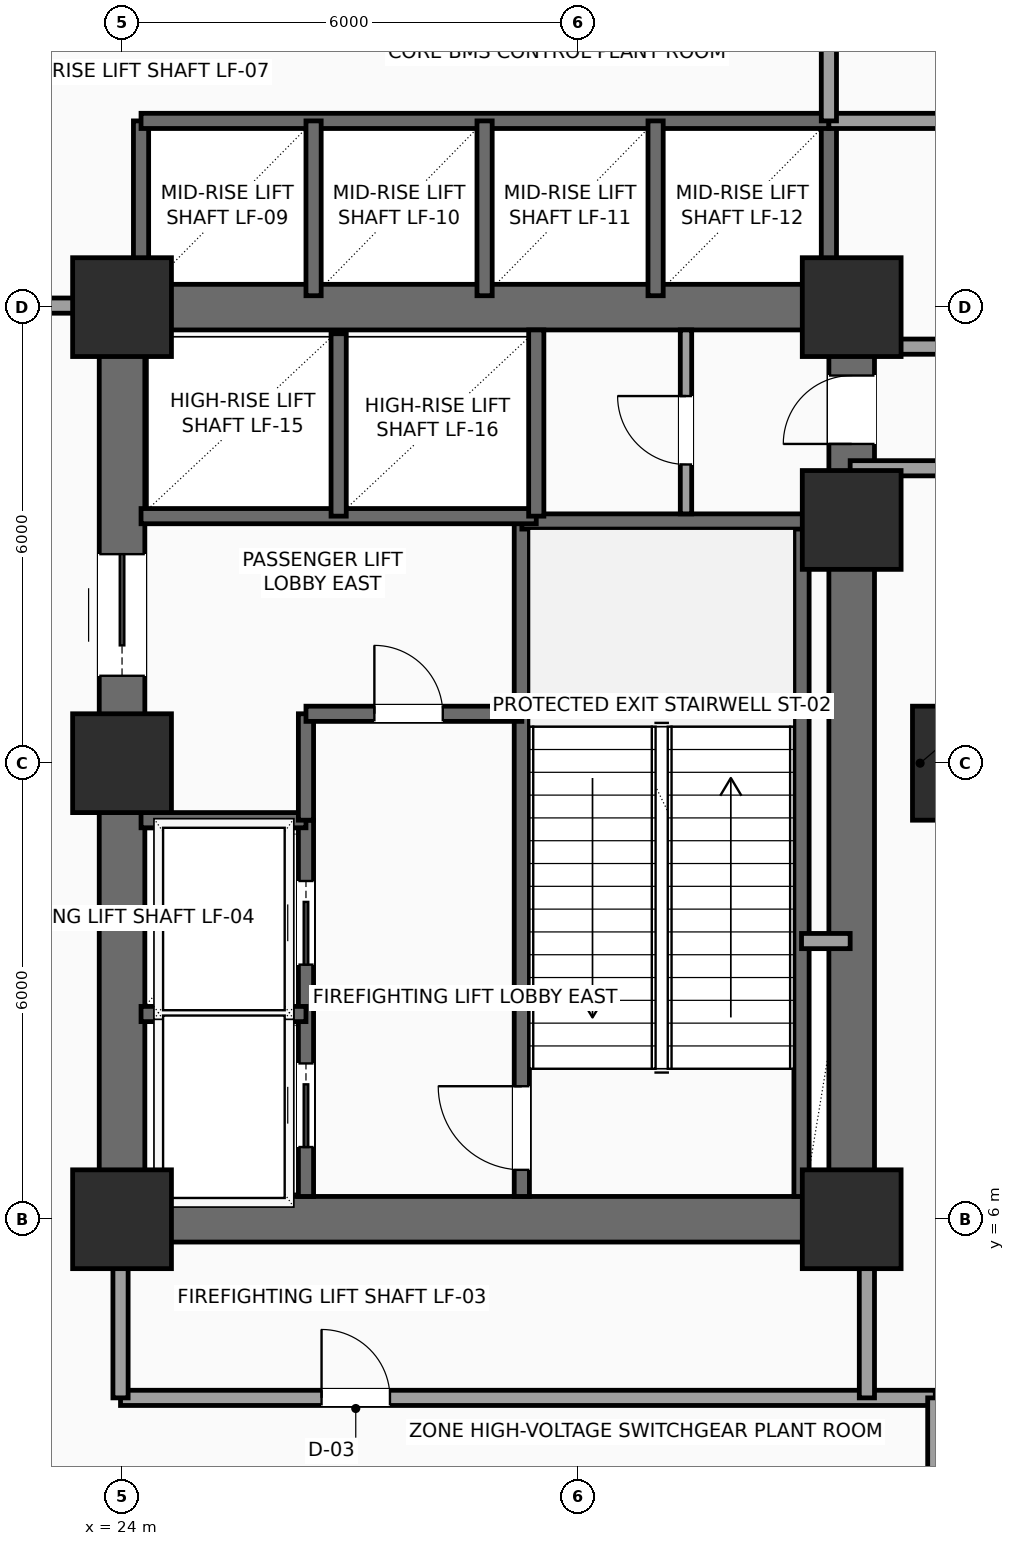
"""IFC4 building model, lengths in metres.
Left out: names, types, materials, properties, quantities, classifications, styles, units other than length and angle.
Written with IfcOpenShell. Run it as: python <this file> out.ifc"""

import sys

from ifc_helpers import new_model, si_unit, direction, frame, frame_2d, origin, origin_2d, place, context, subcontext, project, spatial, rectangle, extrude, element, fill, save


model = new_model("IFC4")
c1 = context("Model", 3, precision=1e-05, world=origin(), true_north=direction((0.0, 1.0)))
c2 = subcontext(c1, "Body", "Model", "MODEL_VIEW")
j1 = project(units=[si_unit("LENGTHUNIT", "METRE"), si_unit("PLANEANGLEUNIT", "RADIAN")], contexts=[c1])
p1 = place(None, origin())
s1 = spatial("IfcSite", under=j1, at=p1, CompositionType="ELEMENT")
p2 = place(p1, origin())
s2 = spatial("IfcBuilding", under=s1, at=p2, CompositionType="ELEMENT")
p3 = place(p2, frame((0.0, 0.0, 27.6)))
s3 = spatial("IfcBuildingStorey", under=s2, at=p3, CompositionType="ELEMENT", Elevation=27.6)
for number, where, z_axis, x_axis in (
    (1, (24.0, 6.0, 0.0), (0.0, 0.0, 1.0), (1.0, 0.0, 0.0)),
    (2, (24.0, 12.0, 0.0), (0.0, 0.0, 1.0), (1.0, 0.0, 0.0)),
    (3, (24.0, 18.0, 0.0), (0.0, 0.0, 1.0), (1.0, 0.0, 0.0)),
    (4, (33.6, 6.0, 0.0), (0.0, 0.0, 1.0), (1.0, 0.0, 0.0)),
    (5, (33.6, 15.2, 0.0), (0.0, 0.0, 1.0), (1.0, 0.0, 0.0)),
    (6, (33.6, 18.0, 0.0), (0.0, 0.0, 1.0), (1.0, 0.0, 0.0)),
):
    element("IfcColumn", number, at=place(p3, frame(where, z_axis=z_axis, x_axis=x_axis)), inside=s3, PredefinedType="COLUMN", context=c2, shape_type="SweptSolid", body=[
        extrude(rectangle(XDim=1.3, YDim=1.3, at=origin_2d()), origin(), (0.0, 0.0, 1.0), 4.8),
    ])
p4 = place(p3, frame((35.15, 12.0, -0.35), z_axis=(0.0, 0.0, 1.0), x_axis=(1.0, 0.0, 0.0)))
e7 = element("IfcColumn", 7, at=p4, inside=s3, PredefinedType="COLUMN", context=c2, shape_type="SweptSolid", body=[
    extrude(rectangle(XDim=1.5, YDim=1.5, at=origin_2d()), origin(), (0.0, 0.0, 1.0), 5.15),
])
for number, where, z_axis, x_axis in (
    (8, (24.0, 6.0, 0.0), (0.0, 0.0, 1.0), (1.0, 0.0, 0.0)),
    (9, (24.0, 18.0, 0.0), (0.0, 0.0, 1.0), (1.0, 0.0, 0.0)),
):
    element("IfcWall", number, at=place(p3, frame(where, z_axis=z_axis, x_axis=x_axis)), inside=s3, PredefinedType="SHEAR", context=c2, shape_type="SweptSolid", body=[
        extrude(rectangle(XDim=9.6, YDim=0.6, at=frame_2d((4.8, 0.0))), origin(), (0.0, 0.0, 1.0), 4.55),
    ])
p5 = place(p3, frame((24.0, 6.0, 0.0), z_axis=(0.0, 0.0, 1.0), x_axis=(0.0, 1.0, 0.0)))
e10 = element("IfcWall", 10, at=p5, inside=s3, PredefinedType="SHEAR", context=c2, shape_type="SweptSolid", body=[
    extrude(rectangle(XDim=12.0, YDim=0.6, at=frame_2d((6.0, 0.0))), origin(), (0.0, 0.0, 1.0), 4.55),
])
p6 = place(p5, frame((7.15, 0.0, 0.0)))
e11 = element("IfcOpeningElement", 11, at=p6, cuts=e10, PredefinedType="OPENING", context=c2, shape_type="SweptSolid", body=[
    extrude(rectangle(XDim=1.6, YDim=2.3, at=frame_2d((0.8, 1.15))), frame((0.0, 0.31, 0.0), z_axis=(0.0, -1.0, 0.0), x_axis=(1.0, 0.0, 0.0)), (0.0, 0.0, 1.0), 0.62),
])
p7 = place(p3, frame((33.6, 6.0, 0.0), z_axis=(0.0, 0.0, 1.0), x_axis=(0.0, 1.0, 0.0)))
e12 = element("IfcWall", 12, at=p7, inside=s3, PredefinedType="SHEAR", context=c2, shape_type="SweptSolid", body=[
    extrude(rectangle(XDim=12.0, YDim=0.6, at=frame_2d((6.0, 0.0))), origin(), (0.0, 0.0, 1.0), 4.55),
])
p8 = place(p7, frame((10.2, 0.0, 0.0)))
e13 = element("IfcOpeningElement", 13, at=p8, cuts=e12, PredefinedType="OPENING", context=c2, shape_type="SweptSolid", body=[
    extrude(rectangle(XDim=0.9, YDim=2.15, at=frame_2d((0.45, 1.075))), frame((0.0, 0.31, 0.0), z_axis=(0.0, -1.0, 0.0), x_axis=(1.0, 0.0, 0.0)), (0.0, 0.0, 1.0), 0.62),
])
p9 = place(p3, frame((29.26, 6.3, 0.0), z_axis=(0.0, 0.0, 1.0), x_axis=(0.0, 1.0, 0.0)))
e14 = element("IfcWall", 14, at=p9, inside=s3, PredefinedType="SHEAR", context=c2, shape_type="SweptSolid", body=[
    extrude(rectangle(XDim=8.88, YDim=0.2, at=frame_2d((4.44, 0.0))), origin(), (0.0, 0.0, 1.0), 4.55),
])
p10 = place(p9, frame((0.35, 0.0, 0.0)))
e15 = element("IfcOpeningElement", 15, at=p10, cuts=e14, PredefinedType="OPENING", context=c2, shape_type="SweptSolid", body=[
    extrude(rectangle(XDim=1.1, YDim=2.2, at=frame_2d((0.55, 1.1))), frame((0.0, 0.11, 0.0), z_axis=(0.0, -1.0, 0.0), x_axis=(1.0, 0.0, 0.0)), (0.0, 0.0, 1.0), 0.22),
])
p11 = place(p3, frame((32.94, 6.3, 0.0), z_axis=(0.0, 0.0, 1.0), x_axis=(0.0, 1.0, 0.0)))
e16 = element("IfcWall", 16, at=p11, inside=s3, PredefinedType="SHEAR", context=c2, shape_type="SweptSolid", body=[
    extrude(rectangle(XDim=8.88, YDim=0.2, at=frame_2d((4.44, 0.0))), origin(), (0.0, 0.0, 1.0), 4.55),
])
p12 = place(p3, frame((29.26, 15.18, 0.0), z_axis=(0.0, 0.0, 1.0), x_axis=(1.0, 0.0, 0.0)))
e17 = element("IfcWall", 17, at=p12, inside=s3, PredefinedType="SHEAR", context=c2, shape_type="SweptSolid", body=[
    extrude(rectangle(XDim=4.04, YDim=0.2, at=frame_2d((2.02, 0.0))), origin(), (0.0, 0.0, 1.0), 4.55),
])
p13 = place(p3, frame((26.42, 6.3, 0.0), z_axis=(0.0, 0.0, 1.0), x_axis=(0.0, 1.0, 0.0)))
e18 = element("IfcWall", 18, at=p13, inside=s3, PredefinedType="SHEAR", context=c2, shape_type="SweptSolid", body=[
    extrude(rectangle(XDim=4.95, YDim=0.2, at=frame_2d((2.475, 0.0))), origin(), (0.0, 0.0, 1.0), 4.55),
])
p14 = place(p13, frame((0.65, 0.0, 0.0)))
e19 = element("IfcOpeningElement", 19, at=p14, cuts=e18, PredefinedType="OPENING", context=c2, shape_type="SweptSolid", body=[
    extrude(rectangle(XDim=1.1, YDim=2.2, at=frame_2d((0.55, 1.1))), frame((0.0, 0.11, 0.0), z_axis=(0.0, -1.0, 0.0), x_axis=(1.0, 0.0, 0.0)), (0.0, 0.0, 1.0), 0.22),
])
p15 = place(p13, frame((3.05, 0.0, 0.0)))
e20 = element("IfcOpeningElement", 20, at=p15, cuts=e18, PredefinedType="OPENING", context=c2, shape_type="SweptSolid", body=[
    extrude(rectangle(XDim=1.1, YDim=2.2, at=frame_2d((0.55, 1.1))), frame((0.0, 0.11, 0.0), z_axis=(0.0, -1.0, 0.0), x_axis=(1.0, 0.0, 0.0)), (0.0, 0.0, 1.0), 0.22),
])
for number, where, z_axis, x_axis in (
    (21, (24.25, 8.7, 0.0), (0.0, 0.0, 1.0), (1.0, 0.0, 0.0)),
    (22, (24.25, 11.25, 0.0), (0.0, 0.0, 1.0), (1.0, 0.0, 0.0)),
):
    element("IfcWall", number, at=place(p3, frame(where, z_axis=z_axis, x_axis=x_axis)), inside=s3, PredefinedType="SHEAR", context=c2, shape_type="SweptSolid", body=[
        extrude(rectangle(XDim=2.17, YDim=0.2, at=frame_2d((1.085, 0.0))), origin(), (0.0, 0.0, 1.0), 4.55),
    ])
p16 = place(p3, frame((26.42, 11.25, 0.0), z_axis=(0.0, 0.0, 1.0), x_axis=(0.0, 1.0, 0.0)))
e23 = element("IfcWall", 23, at=p16, inside=s3, PredefinedType="SHEAR", context=c2, shape_type="SweptSolid", body=[
    extrude(rectangle(XDim=1.4, YDim=0.2, at=frame_2d((0.7, 0.0))), origin(), (0.0, 0.0, 1.0), 4.55),
])
p17 = place(p3, frame((26.42, 12.65, 0.0), z_axis=(0.0, 0.0, 1.0), x_axis=(1.0, 0.0, 0.0)))
e24 = element("IfcWall", 24, at=p17, inside=s3, PredefinedType="SHEAR", context=c2, shape_type="SweptSolid", body=[
    extrude(rectangle(XDim=2.84, YDim=0.2, at=frame_2d((1.42, 0.0))), origin(), (0.0, 0.0, 1.0), 4.55),
])
p18 = place(p17, frame((0.9, 0.0, 0.0)))
e25 = element("IfcOpeningElement", 25, at=p18, cuts=e24, PredefinedType="OPENING", context=c2, shape_type="SweptSolid", body=[
    extrude(rectangle(XDim=0.9, YDim=2.15, at=frame_2d((0.45, 1.075))), frame((0.0, 0.11, 0.0), z_axis=(0.0, -1.0, 0.0), x_axis=(1.0, 0.0, 0.0)), (0.0, 0.0, 1.0), 0.22),
])
p19 = place(p3, frame((32.94, 9.66, 0.0), z_axis=(0.0, 0.0, 1.0), x_axis=(1.0, 0.0, 0.0)))
e26 = element("IfcWall", 26, at=p19, inside=s3, PredefinedType="SOLIDWALL", context=c2, shape_type="SweptSolid", body=[
    extrude(rectangle(XDim=0.64, YDim=0.2, at=frame_2d((0.32, 0.0))), origin(), (0.0, 0.0, 1.0), 4.55),
])
p20 = place(p3, frame((24.25, 15.25, 0.0), z_axis=(0.0, 0.0, 1.0), x_axis=(1.0, 0.0, 0.0)))
e27 = element("IfcWall", 27, at=p20, inside=s3, PredefinedType="SHEAR", context=c2, shape_type="SweptSolid", body=[
    extrude(rectangle(XDim=5.2, YDim=0.2, at=frame_2d((2.6, 0.0))), origin(), (0.0, 0.0, 1.0), 4.55),
])
p21 = place(p3, frame((26.85, 15.25, 0.0), z_axis=(0.0, 0.0, 1.0), x_axis=(0.0, 1.0, 0.0)))
e28 = element("IfcWall", 28, at=p21, inside=s3, PredefinedType="SHEAR", context=c2, shape_type="SweptSolid", body=[
    extrude(rectangle(XDim=2.4, YDim=0.2, at=frame_2d((1.2, 0.0))), origin(), (0.0, 0.0, 1.0), 4.55),
])
p22 = place(p3, frame((29.45, 15.25, 0.0), z_axis=(0.0, 0.0, 1.0), x_axis=(0.0, 1.0, 0.0)))
e29 = element("IfcWall", 29, at=p22, inside=s3, PredefinedType="SHEAR", context=c2, shape_type="SweptSolid", body=[
    extrude(rectangle(XDim=2.45, YDim=0.2, at=frame_2d((1.225, 0.0))), origin(), (0.0, 0.0, 1.0), 4.55),
])
p23 = place(p3, frame((31.42, 15.28, 0.0), z_axis=(0.0, 0.0, 1.0), x_axis=(0.0, 1.0, 0.0)))
e30 = element("IfcWall", 30, at=p23, inside=s3, PredefinedType="PARTITIONING", context=c2, shape_type="SweptSolid", body=[
    extrude(rectangle(XDim=2.42, YDim=0.15, at=frame_2d((1.21, 0.0))), origin(), (0.0, 0.0, 1.0), 4.55),
])
p24 = place(p23, frame((0.65, 0.0, 0.0)))
e31 = element("IfcOpeningElement", 31, at=p24, cuts=e30, PredefinedType="OPENING", context=c2, shape_type="SweptSolid", body=[
    extrude(rectangle(XDim=0.9, YDim=2.15, at=frame_2d((0.45, 1.075))), frame((0.0, 0.085, 0.0), z_axis=(0.0, -1.0, 0.0), x_axis=(1.0, 0.0, 0.0)), (0.0, 0.0, 1.0), 0.17),
])
for number, where, z_axis, x_axis in (
    (32, (33.3, 18.1, 0.0), (0.0, 0.0, 1.0), (0.0, 1.0, 0.0)),
    (33, (24.25, 18.1, 0.0), (0.0, 0.0, 1.0), (0.0, 1.0, 0.0)),
):
    element("IfcWall", number, at=place(p3, frame(where, z_axis=z_axis, x_axis=x_axis)), inside=s3, PredefinedType="SHEAR", context=c2, shape_type="SweptSolid", body=[
        extrude(rectangle(XDim=2.35, YDim=0.2, at=frame_2d((1.175, 0.0))), origin(), (0.0, 0.0, 1.0), 4.55),
    ])
p25 = place(p3, frame((24.25, 20.45, 0.0), z_axis=(0.0, 0.0, 1.0), x_axis=(1.0, 0.0, 0.0)))
e34 = element("IfcWall", 34, at=p25, inside=s3, PredefinedType="SHEAR", context=c2, shape_type="SweptSolid", body=[
    extrude(rectangle(XDim=9.05, YDim=0.2, at=frame_2d((4.525, 0.0))), origin(), (0.0, 0.0, 1.0), 4.55),
])
for number, where, z_axis, x_axis in (
    (35, (26.52, 18.15, 0.0), (0.0, 0.0, 1.0), (0.0, 1.0, 0.0)),
    (36, (28.77, 18.15, 0.0), (0.0, 0.0, 1.0), (0.0, 1.0, 0.0)),
    (37, (31.02, 18.15, 0.0), (0.0, 0.0, 1.0), (0.0, 1.0, 0.0)),
):
    element("IfcWall", number, at=place(p3, frame(where, z_axis=z_axis, x_axis=x_axis)), inside=s3, PredefinedType="SHEAR", context=c2, shape_type="SweptSolid", body=[
        extrude(rectangle(XDim=2.3, YDim=0.2, at=frame_2d((1.15, 0.0))), origin(), (0.0, 0.0, 1.0), 4.55),
    ])
p26 = place(p3, frame((20.5, 18.02, 0.0), z_axis=(0.0, 0.0, 1.0), x_axis=(1.0, 0.0, 0.0)))
e38 = element("IfcWall", 38, at=p26, inside=s3, PredefinedType="SOLIDWALL", context=c2, shape_type="SweptSolid", body=[
    extrude(rectangle(XDim=3.35, YDim=0.2, at=frame_2d((1.675, 0.0))), origin(), (0.0, 0.0, 1.0), 3.892),
])
p27 = place(p3, frame((23.98, 3.65, 0.0), z_axis=(0.0, 0.0, 1.0), x_axis=(1.0, 0.0, 0.0)))
e39 = element("IfcWall", 39, at=p27, inside=s3, PredefinedType="SOLIDWALL", context=c2, shape_type="SweptSolid", body=[
    extrude(rectangle(XDim=10.72, YDim=0.2, at=frame_2d((5.36, 0.0))), origin(), (0.0, 0.0, 1.0), 4.55),
])
p28 = place(p27, frame((2.645, 0.0, 0.0)))
e40 = element("IfcOpeningElement", 40, at=p28, cuts=e39, PredefinedType="OPENING", context=c2, shape_type="SweptSolid", body=[
    extrude(rectangle(XDim=0.9, YDim=2.15, at=frame_2d((0.45, 1.075))), frame((0.0, 0.11, 0.0), z_axis=(0.0, -1.0, 0.0), x_axis=(1.0, 0.0, 0.0)), (0.0, 0.0, 1.0), 0.22),
])
p29 = place(p3, frame((34.7, 3.65, 0.0), z_axis=(0.0, 0.0, 1.0), x_axis=(0.0, -1.0, 0.0)))
e41 = element("IfcWall", 41, at=p29, inside=s3, PredefinedType="SOLIDWALL", context=c2, shape_type="SweptSolid", body=[
    extrude(rectangle(XDim=1.742, YDim=0.2, at=frame_2d((0.871, 0.0))), origin(), (0.0, 0.0, 1.0), 4.55),
])
for number, where, z_axis, x_axis in (
    (42, (36.25, 15.88, 0.0), (0.0, 0.0, 1.0), (-1.0, 0.0, 0.0)),
    (43, (33.58, 17.48, 0.0), (0.0, 0.0, 1.0), (1.0, 0.0, 0.0)),
):
    element("IfcWall", number, at=place(p3, frame(where, z_axis=z_axis, x_axis=x_axis)), inside=s3, PredefinedType="SOLIDWALL", context=c2, shape_type="SweptSolid", body=[
        extrude(rectangle(XDim=2.67, YDim=0.2, at=frame_2d((1.335, 0.0))), origin(), (0.0, 0.0, 1.0), 4.55),
    ])
p30 = place(p3, frame((36.25, 20.45, 0.0), z_axis=(0.0, 0.0, 1.0), x_axis=(-1.0, 0.0, 0.0)))
e44 = element("IfcWall", 44, at=p30, inside=s3, PredefinedType="SOLIDWALL", context=c2, shape_type="SweptSolid", body=[
    extrude(rectangle(XDim=2.95, YDim=0.2, at=frame_2d((1.475, 0.0))), origin(), (0.0, 0.0, 1.0), 4.55),
])
p31 = place(p3, frame((33.3, 20.45, 0.0), z_axis=(0.0, 0.0, 1.0), x_axis=(0.0, 1.0, 0.0)))
e45 = element("IfcWall", 45, at=p31, inside=s3, PredefinedType="SOLIDWALL", context=c2, shape_type="SweptSolid", body=[
    extrude(rectangle(XDim=3.25, YDim=0.2, at=frame_2d((1.625, 0.0))), origin(), (0.0, 0.0, 1.0), 4.55),
])
p32 = place(p3, frame((23.98, 3.65, 0.0), z_axis=(0.0, 0.0, 1.0), x_axis=(0.0, 1.0, 0.0)))
e46 = element("IfcWall", 46, at=p32, inside=s3, PredefinedType="SOLIDWALL", context=c2, shape_type="SweptSolid", body=[
    extrude(rectangle(XDim=2.3, YDim=0.2, at=frame_2d((1.15, 0.0))), origin(), (0.0, 0.0, 1.0), 3.892),
])
p33 = place(p3, frame((33.8, 3.65, 0.0), z_axis=(0.0, 0.0, 1.0), x_axis=(0.0, 1.0, 0.0)))
e47 = element("IfcWall", 47, at=p33, inside=s3, PredefinedType="SOLIDWALL", context=c2, shape_type="SweptSolid", body=[
    extrude(rectangle(XDim=2.3, YDim=0.2, at=frame_2d((1.15, 0.0))), origin(), (0.0, 0.0, 1.0), 4.55),
])
p34 = place(p6, origin())
e48 = element("IfcDoor", 48, at=p34, inside=s3, OperationType="DOUBLE_DOOR_SLIDING", PredefinedType="DOOR", context=c2, shape_type="SweptSolid", body=[
    extrude(rectangle(XDim=1.6, YDim=2.3, at=frame_2d((0.8, 1.15))), frame((0.0, 0.025, 0.0), z_axis=(0.0, -1.0, 0.0), x_axis=(1.0, 0.0, 0.0)), (0.0, 0.0, 1.0), 0.05),
])
fill(e11, e48)
p35 = place(p8, origin())
e49 = element("IfcDoor", 49, at=p35, inside=s3, OperationType="SINGLE_SWING_LEFT", PredefinedType="DOOR", context=c2, shape_type="SweptSolid", body=[
    extrude(rectangle(XDim=0.9, YDim=2.15, at=frame_2d((0.45, 1.075))), frame((0.0, 0.025, 0.0), z_axis=(0.0, -1.0, 0.0), x_axis=(1.0, 0.0, 0.0)), (0.0, 0.0, 1.0), 0.05),
])
fill(e13, e49)
p36 = place(p10, origin())
e50 = element("IfcDoor", 50, at=p36, inside=s3, OperationType="SINGLE_SWING_RIGHT", PredefinedType="DOOR", context=c2, shape_type="SweptSolid", body=[
    extrude(rectangle(XDim=1.1, YDim=2.2, at=frame_2d((0.55, 1.1))), frame((0.0, 0.025, 0.0), z_axis=(0.0, -1.0, 0.0), x_axis=(1.0, 0.0, 0.0)), (0.0, 0.0, 1.0), 0.05),
])
fill(e15, e50)
p37 = place(p14, origin())
e51 = element("IfcDoor", 51, at=p37, inside=s3, OperationType="SLIDING_TO_LEFT", PredefinedType="DOOR", context=c2, shape_type="SweptSolid", body=[
    extrude(rectangle(XDim=1.1, YDim=2.2, at=frame_2d((0.55, 1.1))), frame((0.0, 0.025, 0.0), z_axis=(0.0, -1.0, 0.0), x_axis=(1.0, 0.0, 0.0)), (0.0, 0.0, 1.0), 0.05),
])
fill(e19, e51)
p38 = place(p15, origin())
e52 = element("IfcDoor", 52, at=p38, inside=s3, OperationType="SLIDING_TO_LEFT", PredefinedType="DOOR", context=c2, shape_type="SweptSolid", body=[
    extrude(rectangle(XDim=1.1, YDim=2.2, at=frame_2d((0.55, 1.1))), frame((0.0, 0.025, 0.0), z_axis=(0.0, -1.0, 0.0), x_axis=(1.0, 0.0, 0.0)), (0.0, 0.0, 1.0), 0.05),
])
fill(e20, e52)
p39 = place(p18, origin())
e53 = element("IfcDoor", 53, at=p39, inside=s3, OperationType="SINGLE_SWING_LEFT", PredefinedType="DOOR", context=c2, shape_type="SweptSolid", body=[
    extrude(rectangle(XDim=0.9, YDim=2.15, at=frame_2d((0.45, 1.075))), frame((0.0, 0.025, 0.0), z_axis=(0.0, -1.0, 0.0), x_axis=(1.0, 0.0, 0.0)), (0.0, 0.0, 1.0), 0.05),
])
fill(e25, e53)
p40 = place(p24, origin())
e54 = element("IfcDoor", 54, at=p40, inside=s3, OperationType="SINGLE_SWING_RIGHT", PredefinedType="DOOR", context=c2, shape_type="SweptSolid", body=[
    extrude(rectangle(XDim=0.9, YDim=2.15, at=frame_2d((0.45, 1.075))), frame((0.0, 0.025, 0.0), z_axis=(0.0, -1.0, 0.0), x_axis=(1.0, 0.0, 0.0)), (0.0, 0.0, 1.0), 0.05),
])
fill(e31, e54)
p41 = place(p28, origin())
e55 = element("IfcDoor", 55, at=p41, inside=s3, OperationType="SINGLE_SWING_LEFT", PredefinedType="DOOR", context=c2, shape_type="SweptSolid", body=[
    extrude(rectangle(XDim=0.9, YDim=2.15, at=frame_2d((0.45, 1.075))), frame((0.0, 0.025, 0.0), z_axis=(0.0, -1.0, 0.0), x_axis=(1.0, 0.0, 0.0)), (0.0, 0.0, 1.0), 0.05),
])
fill(e40, e55)
save(model, sys.argv[1])
